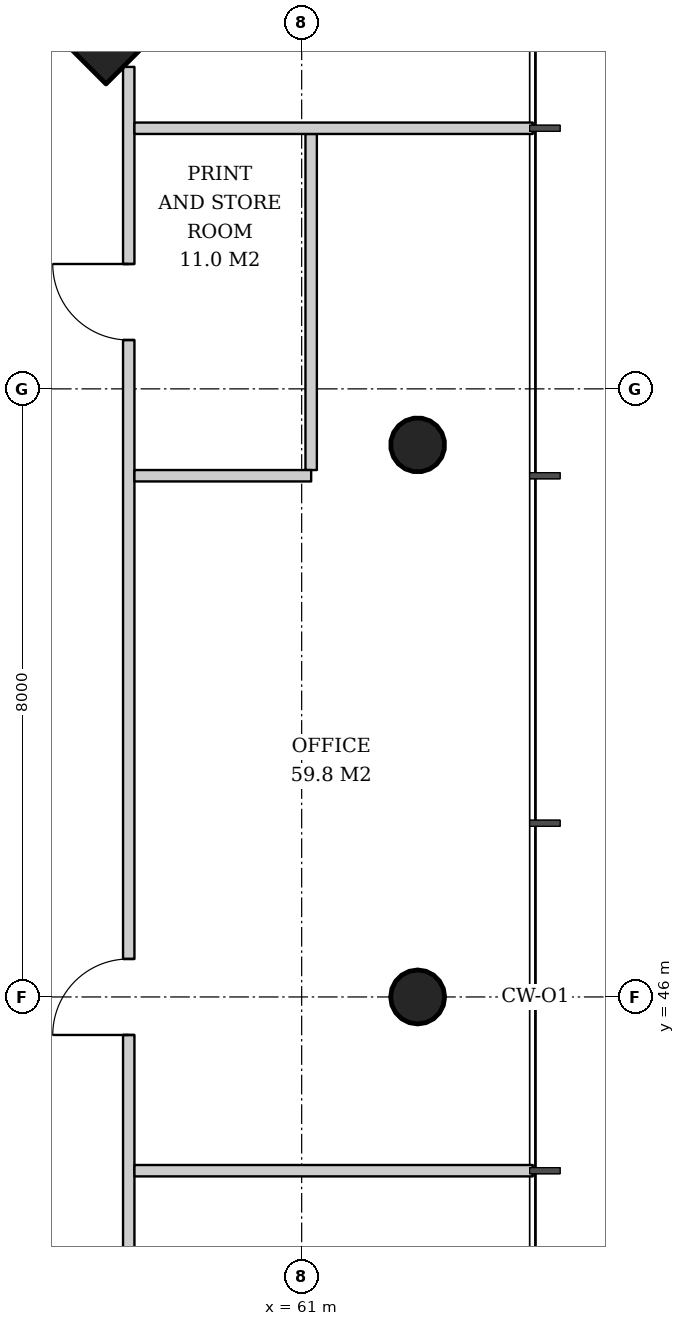
"""IFC4 building model, lengths in metres.
Left out: names, types, materials, properties, quantities, classifications, styles, units other than length and angle.
Written with IfcOpenShell. Run it as: python <this file> out.ifc"""

import sys

from ifc_helpers import new_model, si_unit, direction, frame, frame_2d, origin, origin_2d, place, context, subcontext, project, spatial, rectangle, hollow_circle, extrude, element, fill, save


model = new_model("IFC4")
c1 = context("Model", 3, precision=1e-05, world=origin(), true_north=direction((0.0, 1.0)))
c2 = subcontext(c1, "Body", "Model", "MODEL_VIEW")
j1 = project(units=[si_unit("LENGTHUNIT", "METRE"), si_unit("PLANEANGLEUNIT", "RADIAN")], contexts=[c1])
p1 = place(None, origin())
s1 = spatial("IfcSite", under=j1, at=p1, CompositionType="ELEMENT")
p2 = place(p1, origin())
s2 = spatial("IfcBuilding", under=s1, at=p2, CompositionType="ELEMENT")
p3 = place(p2, frame((0.0, 0.0, 222.4)))
s3 = spatial("IfcBuildingStorey", under=s2, at=p3, CompositionType="ELEMENT", Elevation=222.4)
p4 = place(p3, frame((58.464, 59.464, 0.0), z_axis=(-0.031962158256, -0.031962158256, 0.998977898093), x_axis=(0.707106781187, -0.707106781187, 0.0)))
e1 = element("IfcColumn", 1, at=p4, inside=s3, PredefinedType="COLUMN", context=c2, shape_type="SweptSolid", body=[
    extrude(rectangle(XDim=2.0, YDim=2.0, at=origin_2d()), origin(), (0.0, 0.0, 1.0), 3.804),
])
p5 = place(p3, frame((62.564, 46.0, 0.0), z_axis=(-0.031914348339, 0.0, 0.999490607445), x_axis=(0.0, -1.0, 0.0)))
e2 = element("IfcColumn", 2, at=p5, inside=s3, PredefinedType="COLUMN", context=c2, shape_type="SweptSolid", body=[
    extrude(hollow_circle(Radius=0.355, WallThickness=0.025, at=origin_2d()), origin(), (0.0, 0.0, 1.0), 3.802),
])
p6 = place(p3, frame((62.564, 53.282, 0.0), z_axis=(-0.031910269556, -0.015987237665, 0.999362868496), x_axis=(0.447933021895, -0.894067115991, 0.0)))
e3 = element("IfcColumn", 3, at=p6, inside=s3, PredefinedType="COLUMN", context=c2, shape_type="SweptSolid", body=[
    extrude(hollow_circle(Radius=0.355, WallThickness=0.025, at=origin_2d()), origin(), (0.0, 0.0, 1.0), 3.802),
])
p7 = place(p3, frame((61.125, 52.932, 0.0), z_axis=(0.0, 0.0, 1.0), x_axis=(0.0, 1.0, 0.0)))
e4 = element("IfcWall", 4, at=p7, inside=s3, PredefinedType="PARTITIONING", context=c2, shape_type="SweptSolid", body=[
    extrude(rectangle(XDim=4.421, YDim=0.15, at=frame_2d((2.211, 0.0))), origin(), (0.0, 0.0, 1.0), 2.706),
])
p8 = place(p3, frame((58.725, 33.764, 0.0), z_axis=(0.0, 0.0, 1.0), x_axis=(0.0, 1.0, 0.0)))
e5 = element("IfcWall", 5, at=p8, inside=s3, PredefinedType="PARTITIONING", context=c2, shape_type="SweptSolid", body=[
    extrude(rectangle(XDim=24.472, YDim=0.15, at=frame_2d((12.236, 0.0))), origin(), (0.0, 0.0, 1.0), 2.706),
])
p9 = place(p8, frame((2.593, 0.0, 0.0)))
e6 = element("IfcOpeningElement", 6, at=p9, cuts=e5, PredefinedType="OPENING", context=c2, shape_type="SweptSolid", body=[
    extrude(rectangle(XDim=1.0, YDim=2.1, at=frame_2d((0.5, 1.05))), frame((0.0, 0.085, 0.0), z_axis=(0.0, -1.0, 0.0), x_axis=(1.0, 0.0, 0.0)), (0.0, 0.0, 1.0), 0.17),
])
p10 = place(p8, frame((7.164, 0.0, 0.0)))
e7 = element("IfcOpeningElement", 7, at=p10, cuts=e5, PredefinedType="OPENING", context=c2, shape_type="SweptSolid", body=[
    extrude(rectangle(XDim=1.0, YDim=2.1, at=frame_2d((0.5, 1.05))), frame((0.0, 0.085, 0.0), z_axis=(0.0, -1.0, 0.0), x_axis=(1.0, 0.0, 0.0)), (0.0, 0.0, 1.0), 0.17),
])
p11 = place(p8, frame((11.736, 0.0, 0.0)))
e8 = element("IfcOpeningElement", 8, at=p11, cuts=e5, PredefinedType="OPENING", context=c2, shape_type="SweptSolid", body=[
    extrude(rectangle(XDim=1.0, YDim=2.1, at=frame_2d((0.5, 1.05))), frame((0.0, 0.085, 0.0), z_axis=(0.0, -1.0, 0.0), x_axis=(1.0, 0.0, 0.0)), (0.0, 0.0, 1.0), 0.17),
])
p12 = place(p8, frame((20.879, 0.0, 0.0)))
e9 = element("IfcOpeningElement", 9, at=p12, cuts=e5, PredefinedType="OPENING", context=c2, shape_type="SweptSolid", body=[
    extrude(rectangle(XDim=1.0, YDim=2.1, at=frame_2d((0.5, 1.05))), frame((0.0, 0.085, 0.0), z_axis=(0.0, -1.0, 0.0), x_axis=(1.0, 0.0, 0.0)), (0.0, 0.0, 1.0), 0.17),
])
p13 = place(p3, frame((58.8, 43.714, 0.0), z_axis=(0.0, 0.0, 1.0), x_axis=(1.0, 0.0, 0.0)))
e10 = element("IfcWall", 10, at=p13, inside=s3, PredefinedType="PARTITIONING", context=c2, shape_type="SweptSolid", body=[
    extrude(rectangle(XDim=5.24, YDim=0.15, at=frame_2d((2.62, 0.0))), origin(), (0.0, 0.0, 1.0), 3.52),
])
p14 = place(p3, frame((58.8, 52.857, 0.0), z_axis=(0.0, 0.0, 1.0), x_axis=(1.0, 0.0, 0.0)))
e11 = element("IfcWall", 11, at=p14, inside=s3, PredefinedType="PARTITIONING", context=c2, shape_type="SweptSolid", body=[
    extrude(rectangle(XDim=2.325, YDim=0.15, at=frame_2d((1.163, 0.0))), origin(), (0.0, 0.0, 1.0), 3.52),
])
p15 = place(p3, frame((58.8, 57.428, 0.0), z_axis=(0.0, 0.0, 1.0), x_axis=(1.0, 0.0, 0.0)))
e12 = element("IfcWall", 12, at=p15, inside=s3, PredefinedType="PARTITIONING", context=c2, shape_type="SweptSolid", body=[
    extrude(rectangle(XDim=5.24, YDim=0.15, at=frame_2d((2.62, 0.0))), origin(), (0.0, 0.0, 1.0), 3.52),
])
p16 = place(p11, origin())
e13 = element("IfcDoor", 13, at=p16, inside=s3, OperationType="SINGLE_SWING_LEFT", PredefinedType="DOOR", context=c2, shape_type="SweptSolid", body=[
    extrude(rectangle(XDim=1.0, YDim=2.1, at=frame_2d((0.5, 1.05))), frame((0.0, 0.025, 0.0), z_axis=(0.0, -1.0, 0.0), x_axis=(1.0, 0.0, 0.0)), (0.0, 0.0, 1.0), 0.05),
])
fill(e8, e13)
p17 = place(p12, origin())
e14 = element("IfcDoor", 14, at=p17, inside=s3, OperationType="SINGLE_SWING_RIGHT", PredefinedType="DOOR", context=c2, shape_type="SweptSolid", body=[
    extrude(rectangle(XDim=1.0, YDim=2.1, at=frame_2d((0.5, 1.05))), frame((0.0, 0.025, 0.0), z_axis=(0.0, -1.0, 0.0), x_axis=(1.0, 0.0, 0.0)), (0.0, 0.0, 1.0), 0.05),
])
fill(e9, e14)
save(model, sys.argv[1])
